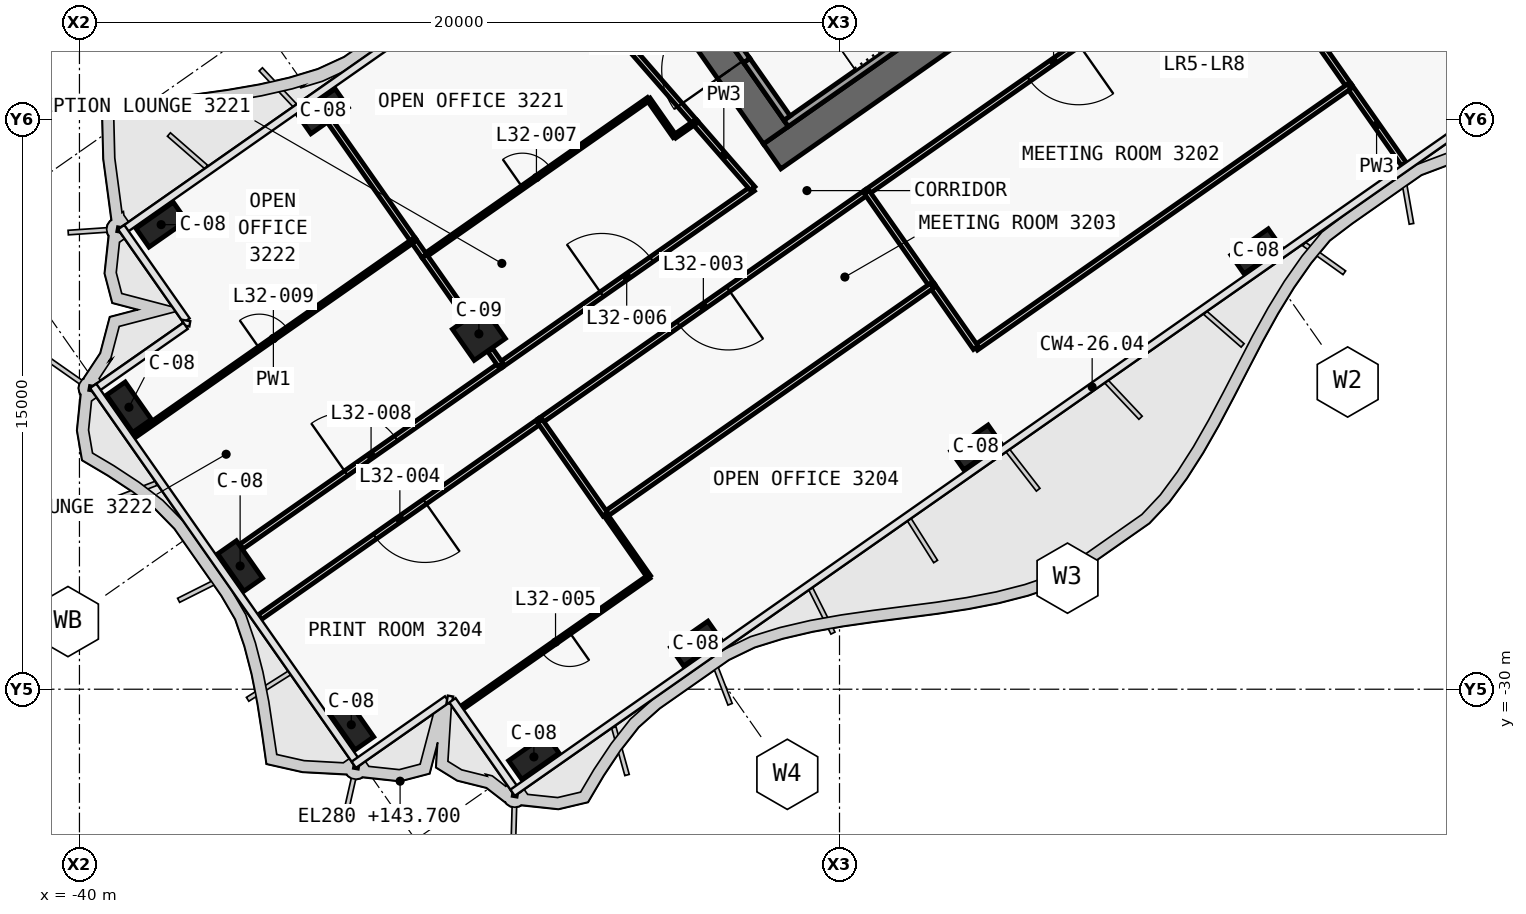
"""IFC4 building model, lengths in metres.
Left out: names, types, materials, properties, quantities, classifications, styles, units other than length and angle.
Written with IfcOpenShell. Run it as: python <this file> out.ifc"""

import sys

from ifc_helpers import new_model, si_unit, direction, frame, frame_2d, origin, origin_2d, place, context, subcontext, project, spatial, polyline, rectangle, outline, extrude, element, fill, save


model = new_model("IFC4")
c1 = context("Model", 3, precision=1e-05, world=origin(), true_north=direction((0.0, 1.0)))
c2 = subcontext(c1, "Body", "Model", "MODEL_VIEW")
j1 = project(units=[si_unit("LENGTHUNIT", "METRE"), si_unit("PLANEANGLEUNIT", "RADIAN")], contexts=[c1])
p1 = place(None, origin())
s1 = spatial("IfcSite", under=j1, at=p1, CompositionType="ELEMENT")
p2 = place(p1, origin())
s2 = spatial("IfcBuilding", under=s1, at=p2, CompositionType="ELEMENT")
p3 = place(p2, frame((0.0, 0.0, 143.7)))
s3 = spatial("IfcBuildingStorey", under=s2, at=p3, CompositionType="ELEMENT", Elevation=143.7)
p4 = place(p3, frame((0.029, -0.712, 0.0), z_axis=(0.0, 0.0, 1.0), x_axis=(-0.819151758019, -0.573576845187, 0.0)))
e1 = element("IfcWall", 1, at=p4, inside=s3, PredefinedType="SHEAR", context=c2, shape_type="SweptSolid", body=[
    extrude(outline(polyline([(26.616, 0.4), (0.56, 0.4), (-0.0, -0.4), (26.616, -0.4), (26.616, 0.4)])), origin(), (0.0, 0.0, 1.0), 3.9),
])
p5 = place(p4, frame((2.966, 0.0, 0.0)))
e2 = element("IfcOpeningElement", 2, at=p5, cuts=e1, PredefinedType="OPENING", context=c2, shape_type="SweptSolid", body=[
    extrude(rectangle(XDim=2.4, YDim=2.1, at=frame_2d((1.2, 1.05))), frame((0.0, 0.41, 0.0), z_axis=(0.0, -1.0, 0.0), x_axis=(1.0, 0.0, 0.0)), (0.0, 0.0, 1.0), 0.82),
])
p6 = place(p4, frame((11.916, 0.0, 0.0)))
e3 = element("IfcOpeningElement", 3, at=p6, cuts=e1, PredefinedType="OPENING", context=c2, shape_type="SweptSolid", body=[
    extrude(rectangle(XDim=2.4, YDim=2.1, at=frame_2d((1.2, 1.05))), frame((0.0, 0.41, 0.0), z_axis=(0.0, -1.0, 0.0), x_axis=(1.0, 0.0, 0.0)), (0.0, 0.0, 1.0), 0.82),
])
p7 = place(p3, frame((-21.675, -15.421, 0.0), z_axis=(0.0, 0.0, 1.0), x_axis=(-0.573581815061, 0.819148278049, 0.0)))
e4 = element("IfcWall", 4, at=p7, inside=s3, PredefinedType="SHEAR", context=c2, shape_type="SweptSolid", body=[
    extrude(outline(polyline([(0.0, 0.4), (0.0, -0.4), (9.6, -0.4), (9.6, 0.4), (0.0, 0.4)])), origin(), (0.0, 0.0, 1.0), 3.9),
])
p8 = place(p7, frame((6.3, 0.0, 0.0)))
e5 = element("IfcOpeningElement", 5, at=p8, cuts=e4, PredefinedType="OPENING", context=c2, shape_type="SweptSolid", body=[
    extrude(rectangle(XDim=1.8, YDim=2.1, at=frame_2d((0.9, 1.05))), frame((0.0, 0.41, 0.0), z_axis=(0.0, -1.0, 0.0), x_axis=(1.0, 0.0, 0.0)), (0.0, 0.0, 1.0), 0.82),
])
p9 = place(p7, frame((2.1, 0.0, 0.0)))
e6 = element("IfcOpeningElement", 6, at=p9, cuts=e4, PredefinedType="OPENING", context=c2, shape_type="SweptSolid", body=[
    extrude(rectangle(XDim=1.8, YDim=2.1, at=frame_2d((0.9, 1.05))), frame((0.0, 0.41, 0.0), z_axis=(0.0, -1.0, 0.0), x_axis=(1.0, 0.0, 0.0)), (0.0, 0.0, 1.0), 0.82),
])
for number, where, z_axis, x_axis in (
    (7, (-9.038, -18.475, 0.0), (0.0, 0.0, 1.0), (-0.819, -0.574, 0.0)),
    (8, (-16.41, -23.637, 0.0), (0.0, 0.0, 1.0), (-0.819, -0.574, 0.0)),
    (9, (-23.782, -28.799, 0.0), (0.0, 0.0, 1.0), (-0.819, -0.574, 0.0)),
    (10, (-28.042, -31.782, 0.0), (0.0, 0.0, 1.0), (-0.819, -0.574, 0.0)),
    (11, (-33.591, -14.792, 0.0), (0.0, 0.0, 1.0), (-0.819, -0.574, 0.0)),
    (12, (-37.85, -17.774, 0.0), (0.0, 0.0, 1.0), (-0.819, -0.574, 0.0)),
    (13, (-32.847, -30.935, 0.0), (0.0, 0.0, 1.0), (-0.574, 0.819, 0.0)),
    (14, (-35.772, -26.757, 0.0), (0.0, 0.0, 1.0), (-0.574, 0.819, 0.0)),
    (15, (-38.698, -22.579, 0.0), (0.0, 0.0, 1.0), (-0.574, 0.819, 0.0)),
):
    element("IfcColumn", number, at=place(p3, frame(where, z_axis=z_axis, x_axis=x_axis)), inside=s3, PredefinedType="COLUMN", context=c2, shape_type="SweptSolid", body=[
        extrude(rectangle(XDim=1.2, YDim=0.6, at=origin_2d()), origin(), (0.0, 0.0, 1.0), 3.9),
    ])
p10 = place(p3, frame((-29.49, -20.649, 0.0), z_axis=(0.0, 0.0, 1.0), x_axis=(-0.819152044289, -0.573576436351, 0.0)))
e16 = element("IfcColumn", 16, at=p10, inside=s3, PredefinedType="COLUMN", context=c2, shape_type="SweptSolid", body=[
    extrude(rectangle(XDim=1.0, YDim=1.0, at=origin_2d()), origin(), (0.0, 0.0, 1.0), 3.9),
])
p11 = place(p3, frame((-14.851, -10.521, 0.0), z_axis=(0.0, 0.0, 1.0), x_axis=(-0.819141584393, -0.57359137434, 0.0)))
e17 = element("IfcWall", 17, at=p11, inside=s3, PredefinedType="SOLIDWALL", context=c2, shape_type="SweptSolid", body=[
    extrude(rectangle(XDim=8.0, YDim=0.2, at=frame_2d((4.0, 0.0))), origin(), (0.0, 0.0, 1.0), 3.62),
])
p12 = place(p3, frame((-21.38, -14.97, 0.0), z_axis=(0.0, 0.0, 1.0), x_axis=(-0.573559770908, 0.819163713305, 0.0)))
e18 = element("IfcWall", 18, at=p12, inside=s3, PredefinedType="SOLIDWALL", context=c2, shape_type="SweptSolid", body=[
    extrude(rectangle(XDim=1.85, YDim=0.2, at=frame_2d((0.925, 0.0))), origin(), (0.0, 0.0, 1.0), 3.62),
])
p13 = place(p3, frame((-22.441, -13.455, 2.15), z_axis=(0.0, 0.0, 1.0), x_axis=(-0.573591692345, 0.819141361715, 0.0)))
e19 = element("IfcWall", 19, at=p13, inside=s3, PredefinedType="SOLIDWALL", context=c2, shape_type="SweptSolid", body=[
    extrude(rectangle(XDim=1.9, YDim=0.2, at=frame_2d((0.95, 0.0))), origin(), (0.0, 0.0, 1.0), 1.47),
])
p14 = place(p3, frame((-28.917, -21.469, 0.0), z_axis=(0.0, 0.0, 1.0), x_axis=(0.819148353684, 0.573581707045, 0.0)))
e20 = element("IfcWall", 20, at=p14, inside=s3, PredefinedType="PARTITIONING", context=c2, shape_type="SweptSolid", body=[
    extrude(rectangle(XDim=8.099, YDim=0.15, at=frame_2d((4.049, 0.0))), origin(), (0.0, 0.0, 1.0), 3.0),
])
p15 = place(p14, frame((3.25, 0.0, 0.0)))
e21 = element("IfcOpeningElement", 21, at=p15, cuts=e20, PredefinedType="OPENING", context=c2, shape_type="SweptSolid", body=[
    extrude(rectangle(XDim=1.6, YDim=2.1, at=frame_2d((0.8, 1.05))), frame((0.0, 0.085, 0.0), z_axis=(0.0, -1.0, 0.0), x_axis=(1.0, 0.0, 0.0)), (0.0, 0.0, 1.0), 0.17),
])
p16 = place(p3, frame((-35.739, -26.247, 0.0), z_axis=(0.0, 0.0, 1.0), x_axis=(0.819128663043, 0.573609826783, 0.0)))
e22 = element("IfcWall", 22, at=p16, inside=s3, PredefinedType="PARTITIONING", context=c2, shape_type="SweptSolid", body=[
    extrude(rectangle(XDim=8.332, YDim=0.15, at=frame_2d((4.166, 0.0))), origin(), (0.0, 0.0, 1.0), 3.0),
])
p17 = place(p16, frame((3.366, 0.0, 0.0)))
e23 = element("IfcOpeningElement", 23, at=p17, cuts=e22, PredefinedType="OPENING", context=c2, shape_type="SweptSolid", body=[
    extrude(rectangle(XDim=1.6, YDim=2.1, at=frame_2d((0.8, 1.05))), frame((0.0, 0.085, 0.0), z_axis=(0.0, -1.0, 0.0), x_axis=(1.0, 0.0, 0.0)), (0.0, 0.0, 1.0), 0.17),
])
p18 = place(p3, frame((-9.451, -10.036, 0.0), z_axis=(0.0, 0.0, 1.0), x_axis=(-0.81915738424, -0.573568810035, 0.0)))
e24 = element("IfcWall", 24, at=p18, inside=s3, PredefinedType="PARTITIONING", context=c2, shape_type="SweptSolid", body=[
    extrude(rectangle(XDim=12.004, YDim=0.15, at=frame_2d((6.002, 0.0))), origin(), (0.0, 0.0, 1.0), 3.0),
])
p19 = place(p18, frame((5.202, 0.0, 0.0)))
e25 = element("IfcOpeningElement", 25, at=p19, cuts=e24, PredefinedType="OPENING", context=c2, shape_type="SweptSolid", body=[
    extrude(rectangle(XDim=1.6, YDim=2.1, at=frame_2d((0.8, 1.05))), frame((0.0, 0.085, 0.0), z_axis=(0.0, -1.0, 0.0), x_axis=(1.0, 0.0, 0.0)), (0.0, 0.0, 1.0), 0.17),
])
p20 = place(p3, frame((-19.281, -16.919, 0.0), z_axis=(0.0, 0.0, 1.0), x_axis=(-0.819145647741, -0.57358557146, 0.0)))
e26 = element("IfcWall", 26, at=p20, inside=s3, PredefinedType="PARTITIONING", context=c2, shape_type="SweptSolid", body=[
    extrude(rectangle(XDim=10.504, YDim=0.15, at=frame_2d((5.252, 0.0))), origin(), (0.0, 0.0, 1.0), 3.0),
])
p21 = place(p20, frame((4.452, 0.0, 0.0)))
e27 = element("IfcOpeningElement", 27, at=p21, cuts=e26, PredefinedType="OPENING", context=c2, shape_type="SweptSolid", body=[
    extrude(rectangle(XDim=1.6, YDim=2.1, at=frame_2d((0.8, 1.05))), frame((0.0, 0.085, 0.0), z_axis=(0.0, -1.0, 0.0), x_axis=(1.0, 0.0, 0.0)), (0.0, 0.0, 1.0), 0.17),
])
p22 = place(p3, frame((-27.882, -22.941, 0.0), z_axis=(0.0, 0.0, 1.0), x_axis=(-0.81915291695, -0.57357519006, 0.0)))
e28 = element("IfcWall", 28, at=p22, inside=s3, PredefinedType="PARTITIONING", context=c2, shape_type="SweptSolid", body=[
    extrude(rectangle(XDim=9.002, YDim=0.15, at=frame_2d((4.501, 0.0))), origin(), (0.0, 0.0, 1.0), 2.9),
])
p23 = place(p22, frame((3.701, 0.0, 0.0)))
e29 = element("IfcOpeningElement", 29, at=p23, cuts=e28, PredefinedType="OPENING", context=c2, shape_type="SweptSolid", body=[
    extrude(rectangle(XDim=1.6, YDim=2.1, at=frame_2d((0.8, 1.05))), frame((0.0, 0.085, 0.0), z_axis=(0.0, -1.0, 0.0), x_axis=(1.0, 0.0, 0.0)), (0.0, 0.0, 1.0), 0.17),
])
p24 = place(p3, frame((-23.802, -15.082, 0.0), z_axis=(0.0, 0.0, 1.0), x_axis=(-0.656784983898, 0.754077903751, 0.0)))
e30 = element("IfcWall", 30, at=p24, inside=s3, PredefinedType="PARTITIONING", context=c2, shape_type="SweptSolid", body=[
    extrude(rectangle(XDim=4.226, YDim=0.15, at=frame_2d((2.113, 0.0))), origin(), (0.0, 0.0, 1.0), 3.62),
])
p25 = place(p3, frame((-22.284, -16.826, 0.0), z_axis=(0.0, 0.0, 1.0), x_axis=(-0.656749820099, 0.754108529192, 0.0)))
e31 = element("IfcWall", 31, at=p25, inside=s3, PredefinedType="PARTITIONING", context=c2, shape_type="SweptSolid", body=[
    extrude(rectangle(XDim=2.317, YDim=0.15, at=frame_2d((1.159, 0.0))), origin(), (0.0, 0.0, 1.0), 3.0),
])
p26 = place(p3, frame((-24.337, -15.454, 0.0), z_axis=(0.0, 0.0, 1.0), x_axis=(0.819196675611, 0.573512690938, 0.0)))
e32 = element("IfcWall", 32, at=p26, inside=s3, PredefinedType="PARTITIONING", context=c2, shape_type="SweptSolid", body=[
    extrude(rectangle(XDim=0.651, YDim=0.1, at=frame_2d((0.325, 0.0))), origin(), (0.0, 0.0, 1.0), 3.62),
])
p27 = place(p3, frame((-25.026, -14.47, 0.0), z_axis=(0.0, 0.0, 1.0), x_axis=(0.57359875229, -0.819136418047, 0.0)))
e33 = element("IfcWall", 33, at=p27, inside=s3, PredefinedType="PARTITIONING", context=c2, shape_type="SweptSolid", body=[
    extrude(rectangle(XDim=1.201, YDim=0.1, at=frame_2d((0.601, 0.0))), origin(), (0.0, 0.0, 1.0), 3.62),
])
p28 = place(p3, frame((-30.924, -18.6, 0.0), z_axis=(0.0, 0.0, 1.0), x_axis=(0.81914589004, 0.573585225429, 0.0)))
e34 = element("IfcWall", 34, at=p28, inside=s3, PredefinedType="PARTITIONING", context=c2, shape_type="SweptSolid", body=[
    extrude(rectangle(XDim=7.2, YDim=0.1, at=frame_2d((3.6, 0.0))), origin(), (0.0, 0.0, 1.0), 3.0),
])
p29 = place(p28, frame((3.15, 0.0, 0.0)))
e35 = element("IfcOpeningElement", 35, at=p29, cuts=e34, PredefinedType="OPENING", context=c2, shape_type="SweptSolid", body=[
    extrude(rectangle(XDim=0.9, YDim=2.1, at=frame_2d((0.45, 1.05))), frame((0.0, 0.06, 0.0), z_axis=(0.0, -1.0, 0.0), x_axis=(1.0, 0.0, 0.0)), (0.0, 0.0, 1.0), 0.12),
])
p30 = place(p3, frame((-31.21, -18.192, 0.0), z_axis=(0.0, 0.0, 1.0), x_axis=(-0.573556436342, 0.819166048082, 0.0)))
e36 = element("IfcWall", 36, at=p30, inside=s3, PredefinedType="PARTITIONING", context=c2, shape_type="SweptSolid", body=[
    extrude(rectangle(XDim=3.831, YDim=0.15, at=frame_2d((1.916, 0.0))), origin(), (0.0, 0.0, 1.0), 3.0),
])
p31 = place(p3, frame((-30.924, -18.6, 0.0), z_axis=(0.0, 0.0, 1.0), x_axis=(-0.573560455774, 0.819163233777, 0.0)))
e37 = element("IfcWall", 37, at=p31, inside=s3, PredefinedType="PARTITIONING", context=c2, shape_type="SweptSolid", body=[
    extrude(rectangle(XDim=0.501, YDim=0.15, at=frame_2d((0.25, 0.0))), origin(), (0.0, 0.0, 1.0), 3.0),
])
p32 = place(p3, frame((-28.916, -21.468, 0.0), z_axis=(0.0, 0.0, 1.0), x_axis=(-0.57322336738, 0.819399152483, 0.0)))
e38 = element("IfcWall", 38, at=p32, inside=s3, PredefinedType="PARTITIONING", context=c2, shape_type="SweptSolid", body=[
    extrude(rectangle(XDim=0.48, YDim=0.15, at=frame_2d((0.24, 0.0))), origin(), (0.0, 0.0, 1.0), 3.0),
])
p33 = place(p3, frame((-29.788, -20.223, 0.0), z_axis=(0.0, 0.0, 1.0), x_axis=(-0.573561636977, 0.819162406723, 0.0)))
e39 = element("IfcWall", 39, at=p33, inside=s3, PredefinedType="PARTITIONING", context=c2, shape_type="SweptSolid", body=[
    extrude(rectangle(XDim=1.98, YDim=0.15, at=frame_2d((0.99, 0.0))), origin(), (0.0, 0.0, 1.0), 3.0),
])
p34 = place(p3, frame((-38.583, -23.353, 0.0), z_axis=(0.0, 0.0, 1.0), x_axis=(0.819141427692, 0.573591598124, 0.0)))
e40 = element("IfcWall", 40, at=p34, inside=s3, PredefinedType="PARTITIONING", context=c2, shape_type="SweptSolid", body=[
    extrude(rectangle(XDim=9.0, YDim=0.1, at=frame_2d((4.5, 0.0))), origin(), (0.0, 0.0, 1.0), 2.9),
])
p35 = place(p34, frame((4.05, 0.0, 0.0)))
e41 = element("IfcOpeningElement", 41, at=p35, cuts=e40, PredefinedType="OPENING", context=c2, shape_type="SweptSolid", body=[
    extrude(rectangle(XDim=0.9, YDim=2.1, at=frame_2d((0.45, 1.05))), frame((0.0, 0.06, 0.0), z_axis=(0.0, -1.0, 0.0), x_axis=(1.0, 0.0, 0.0)), (0.0, 0.0, 1.0), 0.12),
])
p36 = place(p3, frame((-6.583, -14.134, 0.0), z_axis=(0.0, 0.0, 1.0), x_axis=(-0.573557338351, 0.819165416521, 0.0)))
e42 = element("IfcWall", 42, at=p36, inside=s3, PredefinedType="PARTITIONING", context=c2, shape_type="SweptSolid", body=[
    extrude(rectangle(XDim=5.002, YDim=0.15, at=frame_2d((2.501, 0.0))), origin(), (0.0, 0.0, 1.0), 3.62),
])
p37 = place(p3, frame((-5.151, -16.18, 0.0), z_axis=(0.0, 0.0, 1.0), x_axis=(-0.573613022702, 0.819126425033, 0.0)))
e43 = element("IfcWall", 43, at=p37, inside=s3, PredefinedType="PARTITIONING", context=c2, shape_type="SweptSolid", body=[
    extrude(rectangle(XDim=2.501, YDim=0.15, at=frame_2d((1.25, 0.0))), origin(), (0.0, 0.0, 1.0), 2.9),
])
p38 = place(p3, frame((-17.561, -19.379, 0.0), z_axis=(0.0, 0.0, 1.0), x_axis=(-0.573604249862, 0.819132568355, 0.0)))
e44 = element("IfcWall", 44, at=p38, inside=s3, PredefinedType="PARTITIONING", context=c2, shape_type="SweptSolid", body=[
    extrude(rectangle(XDim=3.002, YDim=0.15, at=frame_2d((1.501, 0.0))), origin(), (0.0, 0.0, 1.0), 3.62),
])
p39 = place(p3, frame((-6.585, -14.133, 0.0), z_axis=(0.0, 0.0, 1.0), x_axis=(-0.819156404271, -0.573570209602, 0.0)))
e45 = element("IfcWall", 45, at=p39, inside=s3, PredefinedType="PARTITIONING", context=c2, shape_type="SweptSolid", body=[
    extrude(rectangle(XDim=12.0, YDim=0.15, at=frame_2d((6.0, 0.0))), origin(), (0.0, 0.0, 1.0), 3.0),
])
p40 = place(p3, frame((-16.415, -21.016, 0.0), z_axis=(0.0, 0.0, 1.0), x_axis=(-0.573560601885, 0.819163131473, 0.0)))
e46 = element("IfcWall", 46, at=p40, inside=s3, PredefinedType="PARTITIONING", context=c2, shape_type="SweptSolid", body=[
    extrude(rectangle(XDim=2.001, YDim=0.15, at=frame_2d((1.0, 0.0))), origin(), (0.0, 0.0, 1.0), 3.62),
])
p41 = place(p3, frame((-17.562, -19.377, 0.0), z_axis=(0.0, 0.0, 1.0), x_axis=(-0.81914452344, -0.573587177086, 0.0)))
e47 = element("IfcWall", 47, at=p41, inside=s3, PredefinedType="PARTITIONING", context=c2, shape_type="SweptSolid", body=[
    extrude(rectangle(XDim=10.5, YDim=0.15, at=frame_2d((5.25, 0.0))), origin(), (0.0, 0.0, 1.0), 3.0),
])
p42 = place(p3, frame((-26.163, -25.4, 0.0), z_axis=(0.0, 0.0, 1.0), x_axis=(-0.573615254604, 0.819124862085, 0.0)))
e48 = element("IfcWall", 48, at=p42, inside=s3, PredefinedType="PARTITIONING", context=c2, shape_type="SweptSolid", body=[
    extrude(rectangle(XDim=3.0, YDim=0.15, at=frame_2d((1.5, 0.0))), origin(), (0.0, 0.0, 1.0), 3.0),
])
p43 = place(p3, frame((-25.015, -27.039, 0.0), z_axis=(0.0, 0.0, 1.0), x_axis=(-0.819163097304, -0.573560650686, 0.0)))
e49 = element("IfcWall", 49, at=p43, inside=s3, PredefinedType="PARTITIONING", context=c2, shape_type="SweptSolid", body=[
    extrude(rectangle(XDim=6.0, YDim=0.1, at=frame_2d((3.0, 0.0))), origin(), (0.0, 0.0, 1.0), 3.0),
])
p44 = place(p43, frame((2.55, 0.0, 0.0)))
e50 = element("IfcOpeningElement", 50, at=p44, cuts=e49, PredefinedType="OPENING", context=c2, shape_type="SweptSolid", body=[
    extrude(rectangle(XDim=0.9, YDim=2.1, at=frame_2d((0.45, 1.05))), frame((0.0, 0.06, 0.0), z_axis=(0.0, -1.0, 0.0), x_axis=(1.0, 0.0, 0.0)), (0.0, 0.0, 1.0), 0.12),
])
p45 = place(p3, frame((-26.162, -25.401, 0.0), z_axis=(0.0, 0.0, 1.0), x_axis=(0.573568836472, -0.819157365729, 0.0)))
e51 = element("IfcWall", 51, at=p45, inside=s3, PredefinedType="PARTITIONING", context=c2, shape_type="SweptSolid", body=[
    extrude(rectangle(XDim=2.0, YDim=0.1, at=frame_2d((1.0, 0.0))), origin(), (0.0, 0.0, 1.0), 3.0),
])
p46 = place(p9, origin())
e52 = element("IfcDoor", 52, at=p46, inside=s3, OperationType="DOUBLE_DOOR_SINGLE_SWING", PredefinedType="DOOR", context=c2, shape_type="SweptSolid", body=[
    extrude(rectangle(XDim=1.8, YDim=2.1, at=frame_2d((0.9, 1.05))), frame((0.0, 0.025, 0.0), z_axis=(0.0, -1.0, 0.0), x_axis=(1.0, 0.0, 0.0)), (0.0, 0.0, 1.0), 0.05),
])
fill(e6, e52)
p47 = place(p19, origin())
e53 = element("IfcDoor", 53, at=p47, inside=s3, OperationType="DOUBLE_DOOR_SINGLE_SWING", PredefinedType="DOOR", context=c2, shape_type="SweptSolid", body=[
    extrude(rectangle(XDim=1.6, YDim=2.1, at=frame_2d((0.8, 1.05))), frame((0.0, 0.025, 0.0), z_axis=(0.0, -1.0, 0.0), x_axis=(1.0, 0.0, 0.0)), (0.0, 0.0, 1.0), 0.05),
])
fill(e25, e53)
p48 = place(p21, origin())
e54 = element("IfcDoor", 54, at=p48, inside=s3, OperationType="DOUBLE_DOOR_SINGLE_SWING", PredefinedType="DOOR", context=c2, shape_type="SweptSolid", body=[
    extrude(rectangle(XDim=1.6, YDim=2.1, at=frame_2d((0.8, 1.05))), frame((0.0, 0.025, 0.0), z_axis=(0.0, -1.0, 0.0), x_axis=(1.0, 0.0, 0.0)), (0.0, 0.0, 1.0), 0.05),
])
fill(e27, e54)
p49 = place(p23, origin())
e55 = element("IfcDoor", 55, at=p49, inside=s3, OperationType="DOUBLE_DOOR_SINGLE_SWING", PredefinedType="DOOR", context=c2, shape_type="SweptSolid", body=[
    extrude(rectangle(XDim=1.6, YDim=2.1, at=frame_2d((0.8, 1.05))), frame((0.0, 0.025, 0.0), z_axis=(0.0, -1.0, 0.0), x_axis=(1.0, 0.0, 0.0)), (0.0, 0.0, 1.0), 0.05),
])
fill(e29, e55)
p50 = place(p44, origin())
e56 = element("IfcDoor", 56, at=p50, inside=s3, OperationType="SINGLE_SWING_LEFT", PredefinedType="DOOR", context=c2, shape_type="SweptSolid", body=[
    extrude(rectangle(XDim=0.9, YDim=2.1, at=frame_2d((0.45, 1.05))), frame((0.0, 0.025, 0.0), z_axis=(0.0, -1.0, 0.0), x_axis=(1.0, 0.0, 0.0)), (0.0, 0.0, 1.0), 0.05),
])
fill(e50, e56)
p51 = place(p15, origin())
e57 = element("IfcDoor", 57, at=p51, inside=s3, OperationType="DOUBLE_DOOR_SINGLE_SWING", PredefinedType="DOOR", context=c2, shape_type="SweptSolid", body=[
    extrude(rectangle(XDim=1.6, YDim=2.1, at=frame_2d((0.8, 1.05))), frame((0.0, 0.025, 0.0), z_axis=(0.0, -1.0, 0.0), x_axis=(1.0, 0.0, 0.0)), (0.0, 0.0, 1.0), 0.05),
])
fill(e21, e57)
p52 = place(p29, origin())
e58 = element("IfcDoor", 58, at=p52, inside=s3, OperationType="SINGLE_SWING_LEFT", PredefinedType="DOOR", context=c2, shape_type="SweptSolid", body=[
    extrude(rectangle(XDim=0.9, YDim=2.1, at=frame_2d((0.45, 1.05))), frame((0.0, 0.025, 0.0), z_axis=(0.0, -1.0, 0.0), x_axis=(1.0, 0.0, 0.0)), (0.0, 0.0, 1.0), 0.05),
])
fill(e35, e58)
p53 = place(p17, origin())
e59 = element("IfcDoor", 59, at=p53, inside=s3, OperationType="DOUBLE_DOOR_SINGLE_SWING", PredefinedType="DOOR", context=c2, shape_type="SweptSolid", body=[
    extrude(rectangle(XDim=1.6, YDim=2.1, at=frame_2d((0.8, 1.05))), frame((0.0, 0.025, 0.0), z_axis=(0.0, -1.0, 0.0), x_axis=(1.0, 0.0, 0.0)), (0.0, 0.0, 1.0), 0.05),
])
fill(e23, e59)
p54 = place(p35, origin())
e60 = element("IfcDoor", 60, at=p54, inside=s3, OperationType="SINGLE_SWING_RIGHT", PredefinedType="DOOR", context=c2, shape_type="SweptSolid", body=[
    extrude(rectangle(XDim=0.9, YDim=2.1, at=frame_2d((0.45, 1.05))), frame((0.0, 0.025, 0.0), z_axis=(0.0, -1.0, 0.0), x_axis=(1.0, 0.0, 0.0)), (0.0, 0.0, 1.0), 0.05),
])
fill(e41, e60)
save(model, sys.argv[1])
